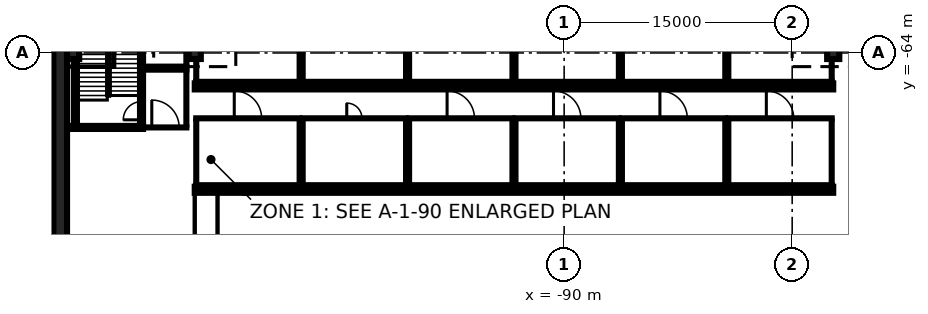
"""IFC4 building model, lengths in metres.
Left out: names, types, materials, properties, quantities, classifications, styles, units other than length and angle.
Written with IfcOpenShell. Run it as: python <this file> out.ifc"""

import sys

from ifc_helpers import new_model, si_unit, direction, frame, frame_2d, origin, origin_2d, place, context, subcontext, project, spatial, rectangle, extrude, element, fill, save


model = new_model("IFC4")
c1 = context("Model", 3, precision=1e-05, world=origin(), true_north=direction((0.0, 1.0)))
c2 = subcontext(c1, "Body", "Model", "MODEL_VIEW")
j1 = project(units=[si_unit("LENGTHUNIT", "METRE"), si_unit("PLANEANGLEUNIT", "RADIAN")], contexts=[c1])
p1 = place(None, origin())
s1 = spatial("IfcSite", under=j1, at=p1, CompositionType="ELEMENT")
p2 = place(p1, origin())
s2 = spatial("IfcBuilding", under=s1, at=p2, CompositionType="ELEMENT")
p3 = place(p2, frame((0.0, 0.0, -12.0)))
s3 = spatial("IfcBuildingStorey", under=s2, at=p3, CompositionType="ELEMENT", Elevation=-12.0)
p4 = place(p3, frame((-123.15, -80.0, 0.0), z_axis=(0.0, 0.0, 1.0), x_axis=(0.0, 1.0, 0.0)))
e1 = element("IfcWall", 1, at=p4, inside=s3, PredefinedType="USERDEFINED", context=c2, shape_type="SweptSolid", body=[
    extrude(rectangle(XDim=160.0, YDim=0.9, at=frame_2d((80.0, 0.0))), origin(), (0.0, 0.0, 1.0), 11.55),
])
for number, where, z_axis, x_axis in (
    (2, (-122.3, -64.0, 0.0), (0.0, 0.0, 1.0), (1.0, 0.0, 0.0)),
    (3, (-114.3, -64.0, 0.0), (0.0, 0.0, 1.0), (1.0, 0.0, 0.0)),
    (4, (-72.3, -64.0, 0.0), (0.0, 0.0, 1.0), (1.0, 0.0, 0.0)),
):
    element("IfcColumn", number, at=place(p3, frame(where, z_axis=z_axis, x_axis=x_axis)), inside=s3, PredefinedType="COLUMN", context=c2, shape_type="SweptSolid", body=[
        extrude(rectangle(XDim=0.8, YDim=0.8, at=origin_2d()), origin(), (0.0, 0.0, 1.0), 4.4),
    ])
p5 = place(p3, frame((-114.3, -72.7, 0.0), z_axis=(0.0, 0.0, 1.0), x_axis=(1.0, 0.0, 0.0)))
e5 = element("IfcWall", 5, at=p5, inside=s3, PredefinedType="PARTITIONING", context=c2, shape_type="SweptSolid", body=[
    extrude(rectangle(XDim=7.0, YDim=0.2, at=frame_2d((3.5, 0.0))), origin(), (0.0, 0.0, 1.0), 4.4),
])
p6 = place(p3, frame((-114.3, -68.3, 0.0), z_axis=(0.0, 0.0, 1.0), x_axis=(1.0, 0.0, 0.0)))
e6 = element("IfcWall", 6, at=p6, inside=s3, PredefinedType="PARTITIONING", context=c2, shape_type="SweptSolid", body=[
    extrude(rectangle(XDim=7.0, YDim=0.2, at=frame_2d((3.5, 0.0))), origin(), (0.0, 0.0, 1.0), 4.4),
])
p7 = place(p6, frame((2.6, 0.0, 0.0)))
e7 = element("IfcOpeningElement", 7, at=p7, cuts=e6, PredefinedType="OPENING", context=c2, shape_type="SweptSolid", body=[
    extrude(rectangle(XDim=1.8, YDim=2.1, at=frame_2d((0.9, 1.05))), frame((0.0, 0.11, 0.0), z_axis=(0.0, -1.0, 0.0), x_axis=(1.0, 0.0, 0.0)), (0.0, 0.0, 1.0), 0.22),
])
for number, where, z_axis, x_axis in (
    (8, (-114.2, -72.6, 0.0), (0.0, 0.0, 1.0), (0.0, 1.0, 0.0)),
    (9, (-107.4, -72.6, 0.0), (0.0, 0.0, 1.0), (0.0, 1.0, 0.0)),
):
    element("IfcWall", number, at=place(p3, frame(where, z_axis=z_axis, x_axis=x_axis)), inside=s3, PredefinedType="PARTITIONING", context=c2, shape_type="SweptSolid", body=[
        extrude(rectangle(XDim=4.2, YDim=0.2, at=frame_2d((2.1, 0.0))), origin(), (0.0, 0.0, 1.0), 4.4),
    ])
p8 = place(p3, frame((-107.3, -72.7, 0.0), z_axis=(0.0, 0.0, 1.0), x_axis=(1.0, 0.0, 0.0)))
e10 = element("IfcWall", 10, at=p8, inside=s3, PredefinedType="PARTITIONING", context=c2, shape_type="SweptSolid", body=[
    extrude(rectangle(XDim=7.0, YDim=0.2, at=frame_2d((3.5, 0.0))), origin(), (0.0, 0.0, 1.0), 4.4),
])
p9 = place(p3, frame((-107.3, -68.3, 0.0), z_axis=(0.0, 0.0, 1.0), x_axis=(1.0, 0.0, 0.0)))
e11 = element("IfcWall", 11, at=p9, inside=s3, PredefinedType="PARTITIONING", context=c2, shape_type="SweptSolid", body=[
    extrude(rectangle(XDim=7.0, YDim=0.2, at=frame_2d((3.5, 0.0))), origin(), (0.0, 0.0, 1.0), 4.4),
])
p10 = place(p9, frame((3.0, 0.0, 0.0)))
e12 = element("IfcOpeningElement", 12, at=p10, cuts=e11, PredefinedType="OPENING", context=c2, shape_type="SweptSolid", body=[
    extrude(rectangle(XDim=1.0, YDim=2.1, at=frame_2d((0.5, 1.05))), frame((0.0, 0.11, 0.0), z_axis=(0.0, -1.0, 0.0), x_axis=(1.0, 0.0, 0.0)), (0.0, 0.0, 1.0), 0.22),
])
for number, where, z_axis, x_axis in (
    (13, (-107.2, -72.6, 0.0), (0.0, 0.0, 1.0), (0.0, 1.0, 0.0)),
    (14, (-100.4, -72.6, 0.0), (0.0, 0.0, 1.0), (0.0, 1.0, 0.0)),
):
    element("IfcWall", number, at=place(p3, frame(where, z_axis=z_axis, x_axis=x_axis)), inside=s3, PredefinedType="PARTITIONING", context=c2, shape_type="SweptSolid", body=[
        extrude(rectangle(XDim=4.2, YDim=0.2, at=frame_2d((2.1, 0.0))), origin(), (0.0, 0.0, 1.0), 4.4),
    ])
p11 = place(p3, frame((-100.3, -72.7, 0.0), z_axis=(0.0, 0.0, 1.0), x_axis=(1.0, 0.0, 0.0)))
e15 = element("IfcWall", 15, at=p11, inside=s3, PredefinedType="PARTITIONING", context=c2, shape_type="SweptSolid", body=[
    extrude(rectangle(XDim=7.0, YDim=0.2, at=frame_2d((3.5, 0.0))), origin(), (0.0, 0.0, 1.0), 4.4),
])
p12 = place(p3, frame((-100.3, -68.3, 0.0), z_axis=(0.0, 0.0, 1.0), x_axis=(1.0, 0.0, 0.0)))
e16 = element("IfcWall", 16, at=p12, inside=s3, PredefinedType="PARTITIONING", context=c2, shape_type="SweptSolid", body=[
    extrude(rectangle(XDim=7.0, YDim=0.2, at=frame_2d((3.5, 0.0))), origin(), (0.0, 0.0, 1.0), 4.4),
])
p13 = place(p12, frame((2.6, 0.0, 0.0)))
e17 = element("IfcOpeningElement", 17, at=p13, cuts=e16, PredefinedType="OPENING", context=c2, shape_type="SweptSolid", body=[
    extrude(rectangle(XDim=1.8, YDim=2.1, at=frame_2d((0.9, 1.05))), frame((0.0, 0.11, 0.0), z_axis=(0.0, -1.0, 0.0), x_axis=(1.0, 0.0, 0.0)), (0.0, 0.0, 1.0), 0.22),
])
for number, where, z_axis, x_axis in (
    (18, (-100.2, -72.6, 0.0), (0.0, 0.0, 1.0), (0.0, 1.0, 0.0)),
    (19, (-93.4, -72.6, 0.0), (0.0, 0.0, 1.0), (0.0, 1.0, 0.0)),
):
    element("IfcWall", number, at=place(p3, frame(where, z_axis=z_axis, x_axis=x_axis)), inside=s3, PredefinedType="PARTITIONING", context=c2, shape_type="SweptSolid", body=[
        extrude(rectangle(XDim=4.2, YDim=0.2, at=frame_2d((2.1, 0.0))), origin(), (0.0, 0.0, 1.0), 4.4),
    ])
p14 = place(p3, frame((-93.3, -72.7, 0.0), z_axis=(0.0, 0.0, 1.0), x_axis=(1.0, 0.0, 0.0)))
e20 = element("IfcWall", 20, at=p14, inside=s3, PredefinedType="PARTITIONING", context=c2, shape_type="SweptSolid", body=[
    extrude(rectangle(XDim=7.0, YDim=0.2, at=frame_2d((3.5, 0.0))), origin(), (0.0, 0.0, 1.0), 4.4),
])
p15 = place(p3, frame((-93.3, -68.3, 0.0), z_axis=(0.0, 0.0, 1.0), x_axis=(1.0, 0.0, 0.0)))
e21 = element("IfcWall", 21, at=p15, inside=s3, PredefinedType="PARTITIONING", context=c2, shape_type="SweptSolid", body=[
    extrude(rectangle(XDim=7.0, YDim=0.2, at=frame_2d((3.5, 0.0))), origin(), (0.0, 0.0, 1.0), 4.4),
])
p16 = place(p15, frame((2.6, 0.0, 0.0)))
e22 = element("IfcOpeningElement", 22, at=p16, cuts=e21, PredefinedType="OPENING", context=c2, shape_type="SweptSolid", body=[
    extrude(rectangle(XDim=1.8, YDim=2.1, at=frame_2d((0.9, 1.05))), frame((0.0, 0.11, 0.0), z_axis=(0.0, -1.0, 0.0), x_axis=(1.0, 0.0, 0.0)), (0.0, 0.0, 1.0), 0.22),
])
for number, where, z_axis, x_axis in (
    (23, (-93.2, -72.6, 0.0), (0.0, 0.0, 1.0), (0.0, 1.0, 0.0)),
    (24, (-86.4, -72.6, 0.0), (0.0, 0.0, 1.0), (0.0, 1.0, 0.0)),
):
    element("IfcWall", number, at=place(p3, frame(where, z_axis=z_axis, x_axis=x_axis)), inside=s3, PredefinedType="PARTITIONING", context=c2, shape_type="SweptSolid", body=[
        extrude(rectangle(XDim=4.2, YDim=0.2, at=frame_2d((2.1, 0.0))), origin(), (0.0, 0.0, 1.0), 4.4),
    ])
p17 = place(p3, frame((-86.3, -72.7, 0.0), z_axis=(0.0, 0.0, 1.0), x_axis=(1.0, 0.0, 0.0)))
e25 = element("IfcWall", 25, at=p17, inside=s3, PredefinedType="PARTITIONING", context=c2, shape_type="SweptSolid", body=[
    extrude(rectangle(XDim=7.0, YDim=0.2, at=frame_2d((3.5, 0.0))), origin(), (0.0, 0.0, 1.0), 4.4),
])
p18 = place(p3, frame((-86.3, -68.3, 0.0), z_axis=(0.0, 0.0, 1.0), x_axis=(1.0, 0.0, 0.0)))
e26 = element("IfcWall", 26, at=p18, inside=s3, PredefinedType="PARTITIONING", context=c2, shape_type="SweptSolid", body=[
    extrude(rectangle(XDim=7.0, YDim=0.2, at=frame_2d((3.5, 0.0))), origin(), (0.0, 0.0, 1.0), 4.4),
])
p19 = place(p18, frame((2.6, 0.0, 0.0)))
e27 = element("IfcOpeningElement", 27, at=p19, cuts=e26, PredefinedType="OPENING", context=c2, shape_type="SweptSolid", body=[
    extrude(rectangle(XDim=1.8, YDim=2.1, at=frame_2d((0.9, 1.05))), frame((0.0, 0.11, 0.0), z_axis=(0.0, -1.0, 0.0), x_axis=(1.0, 0.0, 0.0)), (0.0, 0.0, 1.0), 0.22),
])
for number, where, z_axis, x_axis in (
    (28, (-86.2, -72.6, 0.0), (0.0, 0.0, 1.0), (0.0, 1.0, 0.0)),
    (29, (-79.4, -72.6, 0.0), (0.0, 0.0, 1.0), (0.0, 1.0, 0.0)),
):
    element("IfcWall", number, at=place(p3, frame(where, z_axis=z_axis, x_axis=x_axis)), inside=s3, PredefinedType="PARTITIONING", context=c2, shape_type="SweptSolid", body=[
        extrude(rectangle(XDim=4.2, YDim=0.2, at=frame_2d((2.1, 0.0))), origin(), (0.0, 0.0, 1.0), 4.4),
    ])
p20 = place(p3, frame((-79.3, -72.7, 0.0), z_axis=(0.0, 0.0, 1.0), x_axis=(1.0, 0.0, 0.0)))
e30 = element("IfcWall", 30, at=p20, inside=s3, PredefinedType="PARTITIONING", context=c2, shape_type="SweptSolid", body=[
    extrude(rectangle(XDim=7.0, YDim=0.2, at=frame_2d((3.5, 0.0))), origin(), (0.0, 0.0, 1.0), 4.4),
])
p21 = place(p3, frame((-79.3, -68.3, 0.0), z_axis=(0.0, 0.0, 1.0), x_axis=(1.0, 0.0, 0.0)))
e31 = element("IfcWall", 31, at=p21, inside=s3, PredefinedType="PARTITIONING", context=c2, shape_type="SweptSolid", body=[
    extrude(rectangle(XDim=7.0, YDim=0.2, at=frame_2d((3.5, 0.0))), origin(), (0.0, 0.0, 1.0), 4.4),
])
p22 = place(p21, frame((2.6, 0.0, 0.0)))
e32 = element("IfcOpeningElement", 32, at=p22, cuts=e31, PredefinedType="OPENING", context=c2, shape_type="SweptSolid", body=[
    extrude(rectangle(XDim=1.8, YDim=2.1, at=frame_2d((0.9, 1.05))), frame((0.0, 0.11, 0.0), z_axis=(0.0, -1.0, 0.0), x_axis=(1.0, 0.0, 0.0)), (0.0, 0.0, 1.0), 0.22),
])
for number, where, z_axis, x_axis in (
    (33, (-79.2, -72.6, 0.0), (0.0, 0.0, 1.0), (0.0, 1.0, 0.0)),
    (34, (-72.4, -72.6, 0.0), (0.0, 0.0, 1.0), (0.0, 1.0, 0.0)),
):
    element("IfcWall", number, at=place(p3, frame(where, z_axis=z_axis, x_axis=x_axis)), inside=s3, PredefinedType="PARTITIONING", context=c2, shape_type="SweptSolid", body=[
        extrude(rectangle(XDim=4.2, YDim=0.2, at=frame_2d((2.1, 0.0))), origin(), (0.0, 0.0, 1.0), 4.4),
    ])
p23 = place(p3, frame((-114.3, -65.9, 0.0), z_axis=(0.0, 0.0, 1.0), x_axis=(1.0, 0.0, 0.0)))
e35 = element("IfcWall", 35, at=p23, inside=s3, PredefinedType="PARTITIONING", context=c2, shape_type="SweptSolid", body=[
    extrude(rectangle(XDim=7.0, YDim=0.2, at=frame_2d((3.5, 0.0))), origin(), (0.0, 0.0, 1.0), 4.4),
])
p24 = place(p3, frame((-114.2, -65.8, 0.0), z_axis=(0.0, 0.0, 1.0), x_axis=(0.0, 1.0, 0.0)))
e36 = element("IfcWall", 36, at=p24, inside=s3, PredefinedType="PARTITIONING", context=c2, shape_type="SweptSolid", body=[
    extrude(rectangle(XDim=1.4, YDim=0.2, at=frame_2d((0.7, 0.0))), origin(), (0.0, 0.0, 1.0), 4.4),
])
p25 = place(p3, frame((-107.4, -65.8, 0.0), z_axis=(0.0, 0.0, 1.0), x_axis=(0.0, 1.0, 0.0)))
e37 = element("IfcWall", 37, at=p25, inside=s3, PredefinedType="PARTITIONING", context=c2, shape_type="SweptSolid", body=[
    extrude(rectangle(XDim=4.2, YDim=0.2, at=frame_2d((2.1, 0.0))), origin(), (0.0, 0.0, 1.0), 4.4),
])
p26 = place(p3, frame((-107.3, -65.9, 0.0), z_axis=(0.0, 0.0, 1.0), x_axis=(1.0, 0.0, 0.0)))
e38 = element("IfcWall", 38, at=p26, inside=s3, PredefinedType="PARTITIONING", context=c2, shape_type="SweptSolid", body=[
    extrude(rectangle(XDim=7.0, YDim=0.2, at=frame_2d((3.5, 0.0))), origin(), (0.0, 0.0, 1.0), 4.4),
])
for number, where, z_axis, x_axis in (
    (39, (-107.2, -65.8, 0.0), (0.0, 0.0, 1.0), (0.0, 1.0, 0.0)),
    (40, (-100.4, -65.8, 0.0), (0.0, 0.0, 1.0), (0.0, 1.0, 0.0)),
):
    element("IfcWall", number, at=place(p3, frame(where, z_axis=z_axis, x_axis=x_axis)), inside=s3, PredefinedType="PARTITIONING", context=c2, shape_type="SweptSolid", body=[
        extrude(rectangle(XDim=4.2, YDim=0.2, at=frame_2d((2.1, 0.0))), origin(), (0.0, 0.0, 1.0), 4.4),
    ])
p27 = place(p3, frame((-100.3, -65.9, 0.0), z_axis=(0.0, 0.0, 1.0), x_axis=(1.0, 0.0, 0.0)))
e41 = element("IfcWall", 41, at=p27, inside=s3, PredefinedType="PARTITIONING", context=c2, shape_type="SweptSolid", body=[
    extrude(rectangle(XDim=7.0, YDim=0.2, at=frame_2d((3.5, 0.0))), origin(), (0.0, 0.0, 1.0), 4.4),
])
for number, where, z_axis, x_axis in (
    (42, (-100.2, -65.8, 0.0), (0.0, 0.0, 1.0), (0.0, 1.0, 0.0)),
    (43, (-93.4, -65.8, 0.0), (0.0, 0.0, 1.0), (0.0, 1.0, 0.0)),
):
    element("IfcWall", number, at=place(p3, frame(where, z_axis=z_axis, x_axis=x_axis)), inside=s3, PredefinedType="PARTITIONING", context=c2, shape_type="SweptSolid", body=[
        extrude(rectangle(XDim=4.2, YDim=0.2, at=frame_2d((2.1, 0.0))), origin(), (0.0, 0.0, 1.0), 4.4),
    ])
p28 = place(p3, frame((-93.3, -65.9, 0.0), z_axis=(0.0, 0.0, 1.0), x_axis=(1.0, 0.0, 0.0)))
e44 = element("IfcWall", 44, at=p28, inside=s3, PredefinedType="PARTITIONING", context=c2, shape_type="SweptSolid", body=[
    extrude(rectangle(XDim=7.0, YDim=0.2, at=frame_2d((3.5, 0.0))), origin(), (0.0, 0.0, 1.0), 4.4),
])
for number, where, z_axis, x_axis in (
    (45, (-93.2, -65.8, 0.0), (0.0, 0.0, 1.0), (0.0, 1.0, 0.0)),
    (46, (-86.4, -65.8, 0.0), (0.0, 0.0, 1.0), (0.0, 1.0, 0.0)),
):
    element("IfcWall", number, at=place(p3, frame(where, z_axis=z_axis, x_axis=x_axis)), inside=s3, PredefinedType="PARTITIONING", context=c2, shape_type="SweptSolid", body=[
        extrude(rectangle(XDim=4.2, YDim=0.2, at=frame_2d((2.1, 0.0))), origin(), (0.0, 0.0, 1.0), 4.4),
    ])
p29 = place(p3, frame((-86.3, -65.9, 0.0), z_axis=(0.0, 0.0, 1.0), x_axis=(1.0, 0.0, 0.0)))
e47 = element("IfcWall", 47, at=p29, inside=s3, PredefinedType="PARTITIONING", context=c2, shape_type="SweptSolid", body=[
    extrude(rectangle(XDim=7.0, YDim=0.2, at=frame_2d((3.5, 0.0))), origin(), (0.0, 0.0, 1.0), 4.4),
])
for number, where, z_axis, x_axis in (
    (48, (-86.2, -65.8, 0.0), (0.0, 0.0, 1.0), (0.0, 1.0, 0.0)),
    (49, (-79.4, -65.8, 0.0), (0.0, 0.0, 1.0), (0.0, 1.0, 0.0)),
):
    element("IfcWall", number, at=place(p3, frame(where, z_axis=z_axis, x_axis=x_axis)), inside=s3, PredefinedType="PARTITIONING", context=c2, shape_type="SweptSolid", body=[
        extrude(rectangle(XDim=4.2, YDim=0.2, at=frame_2d((2.1, 0.0))), origin(), (0.0, 0.0, 1.0), 4.4),
    ])
p30 = place(p3, frame((-79.3, -65.9, 0.0), z_axis=(0.0, 0.0, 1.0), x_axis=(1.0, 0.0, 0.0)))
e50 = element("IfcWall", 50, at=p30, inside=s3, PredefinedType="PARTITIONING", context=c2, shape_type="SweptSolid", body=[
    extrude(rectangle(XDim=7.0, YDim=0.2, at=frame_2d((3.5, 0.0))), origin(), (0.0, 0.0, 1.0), 4.4),
])
p31 = place(p3, frame((-79.2, -65.8, 0.0), z_axis=(0.0, 0.0, 1.0), x_axis=(0.0, 1.0, 0.0)))
e51 = element("IfcWall", 51, at=p31, inside=s3, PredefinedType="PARTITIONING", context=c2, shape_type="SweptSolid", body=[
    extrude(rectangle(XDim=4.2, YDim=0.2, at=frame_2d((2.1, 0.0))), origin(), (0.0, 0.0, 1.0), 4.4),
])
p32 = place(p3, frame((-72.4, -65.8, 0.0), z_axis=(0.0, 0.0, 1.0), x_axis=(0.0, 1.0, 0.0)))
e52 = element("IfcWall", 52, at=p32, inside=s3, PredefinedType="PARTITIONING", context=c2, shape_type="SweptSolid", body=[
    extrude(rectangle(XDim=1.4, YDim=0.2, at=frame_2d((0.7, 0.0))), origin(), (0.0, 0.0, 1.0), 4.4),
])
p33 = place(p3, frame((-117.7, -68.9, 0.0), z_axis=(0.0, 0.0, 1.0), x_axis=(1.0, 0.0, 0.0)))
e53 = element("IfcWall", 53, at=p33, inside=s3, PredefinedType="PARTITIONING", context=c2, shape_type="SweptSolid", body=[
    extrude(rectangle(XDim=2.95, YDim=0.2, at=frame_2d((1.475, 0.0))), origin(), (0.0, 0.0, 1.0), 4.4),
])
p34 = place(p33, frame((0.575, 0.0, 0.0)))
e54 = element("IfcOpeningElement", 54, at=p34, cuts=e53, PredefinedType="OPENING", context=c2, shape_type="SweptSolid", body=[
    extrude(rectangle(XDim=1.8, YDim=2.1, at=frame_2d((0.9, 1.05))), frame((0.0, 0.11, 0.0), z_axis=(0.0, -1.0, 0.0), x_axis=(1.0, 0.0, 0.0)), (0.0, 0.0, 1.0), 0.22),
])
p35 = place(p3, frame((-117.7, -65.1, 0.0), z_axis=(0.0, 0.0, 1.0), x_axis=(1.0, 0.0, 0.0)))
e55 = element("IfcWall", 55, at=p35, inside=s3, PredefinedType="PARTITIONING", context=c2, shape_type="SweptSolid", body=[
    extrude(rectangle(XDim=2.95, YDim=0.2, at=frame_2d((1.475, 0.0))), origin(), (0.0, 0.0, 1.0), 4.4),
])
p36 = place(p3, frame((-114.85, -68.8, 0.0), z_axis=(0.0, 0.0, 1.0), x_axis=(0.0, 1.0, 0.0)))
e56 = element("IfcWall", 56, at=p36, inside=s3, PredefinedType="PARTITIONING", context=c2, shape_type="SweptSolid", body=[
    extrude(rectangle(XDim=3.6, YDim=0.2, at=frame_2d((1.8, 0.0))), origin(), (0.0, 0.0, 1.0), 4.4),
])
p37 = place(p3, frame((-117.7, -64.9, 0.0), z_axis=(0.0, 0.0, 1.0), x_axis=(1.0, 0.0, 0.0)))
e57 = element("IfcWall", 57, at=p37, inside=s3, PredefinedType="PARTITIONING", context=c2, shape_type="SweptSolid", body=[
    extrude(rectangle(XDim=2.95, YDim=0.2, at=frame_2d((1.475, 0.0))), origin(), (0.0, 0.0, 1.0), 4.4),
])
p38 = place(p3, frame((-114.85, -64.8, 0.0), z_axis=(0.0, 0.0, 1.0), x_axis=(0.0, 1.0, 0.0)))
e58 = element("IfcWall", 58, at=p38, inside=s3, PredefinedType="PARTITIONING", context=c2, shape_type="SweptSolid", body=[
    extrude(rectangle(XDim=5.6, YDim=0.2, at=frame_2d((2.8, 0.0))), origin(), (0.0, 0.0, 1.0), 4.4),
])
p39 = place(p3, frame((-122.15, -68.8, 0.0), z_axis=(0.0, 0.0, 1.0), x_axis=(0.0, 1.0, 0.0)))
e59 = element("IfcWall", 59, at=p39, inside=s3, PredefinedType="SOLIDWALL", context=c2, shape_type="SweptSolid", body=[
    extrude(rectangle(XDim=9.6, YDim=0.2, at=frame_2d((4.8, 0.0))), origin(), (0.0, 0.0, 1.0), 4.4),
])
p40 = place(p3, frame((-117.8, -68.8, 0.0), z_axis=(0.0, 0.0, 1.0), x_axis=(0.0, 1.0, 0.0)))
e60 = element("IfcWall", 60, at=p40, inside=s3, PredefinedType="SOLIDWALL", context=c2, shape_type="SweptSolid", body=[
    extrude(rectangle(XDim=9.6, YDim=0.2, at=frame_2d((4.8, 0.0))), origin(), (0.0, 0.0, 1.0), 4.4),
])
p41 = place(p40, frame((0.4, 0.0, 0.0)))
e61 = element("IfcOpeningElement", 61, at=p41, cuts=e60, PredefinedType="OPENING", context=c2, shape_type="SweptSolid", body=[
    extrude(rectangle(XDim=1.2, YDim=2.1, at=frame_2d((0.6, 1.05))), frame((0.0, 0.11, 0.0), z_axis=(0.0, -1.0, 0.0), x_axis=(1.0, 0.0, 0.0)), (0.0, 0.0, 1.0), 0.22),
])
p42 = place(p3, frame((-117.7, -68.9, 0.0), z_axis=(0.0, 0.0, 1.0), x_axis=(-1.0, 0.0, 0.0)))
e62 = element("IfcWall", 62, at=p42, inside=s3, PredefinedType="SOLIDWALL", context=c2, shape_type="SweptSolid", body=[
    extrude(rectangle(XDim=5.0, YDim=0.2, at=frame_2d((2.5, 0.0))), origin(), (0.0, 0.0, 1.0), 4.4),
])
p43 = place(p3, frame((-114.3, -73.0, 0.0), z_axis=(0.0, 0.0, 1.0), x_axis=(1.0, 0.0, 0.0)))
e63 = element("IfcWall", 63, at=p43, inside=s3, PredefinedType="SOLIDWALL", context=c2, shape_type="SweptSolid", body=[
    extrude(rectangle(XDim=3.3, YDim=0.4, at=frame_2d((1.65, 0.0))), origin(), (0.0, 0.0, 1.0), 4.4),
])
p44 = place(p3, frame((-111.0, -73.0, 0.0), z_axis=(0.0, 0.0, 1.0), x_axis=(1.0, 0.0, 0.0)))
e64 = element("IfcWall", 64, at=p44, inside=s3, PredefinedType="SOLIDWALL", context=c2, shape_type="SweptSolid", body=[
    extrude(rectangle(XDim=38.7, YDim=0.4, at=frame_2d((19.35, 0.0))), origin(), (0.0, 0.0, 1.0), 4.4),
])
p45 = place(p3, frame((-114.3, -66.2, 0.0), z_axis=(0.0, 0.0, 1.0), x_axis=(1.0, 0.0, 0.0)))
e65 = element("IfcWall", 65, at=p45, inside=s3, PredefinedType="SOLIDWALL", context=c2, shape_type="SweptSolid", body=[
    extrude(rectangle(XDim=42.0, YDim=0.4, at=frame_2d((21.0, 0.0))), origin(), (0.0, 0.0, 1.0), 4.4),
])
p46 = place(p7, origin())
e66 = element("IfcDoor", 66, at=p46, inside=s3, OperationType="DOUBLE_DOOR_SINGLE_SWING", PredefinedType="DOOR", context=c2, shape_type="SweptSolid", body=[
    extrude(rectangle(XDim=1.8, YDim=2.1, at=frame_2d((0.9, 1.05))), frame((0.0, 0.025, 0.0), z_axis=(0.0, -1.0, 0.0), x_axis=(1.0, 0.0, 0.0)), (0.0, 0.0, 1.0), 0.05),
])
fill(e7, e66)
p47 = place(p10, origin())
e67 = element("IfcDoor", 67, at=p47, inside=s3, OperationType="SINGLE_SWING_LEFT", PredefinedType="DOOR", context=c2, shape_type="SweptSolid", body=[
    extrude(rectangle(XDim=1.0, YDim=2.1, at=frame_2d((0.5, 1.05))), frame((0.0, 0.025, 0.0), z_axis=(0.0, -1.0, 0.0), x_axis=(1.0, 0.0, 0.0)), (0.0, 0.0, 1.0), 0.05),
])
fill(e12, e67)
p48 = place(p13, origin())
e68 = element("IfcDoor", 68, at=p48, inside=s3, OperationType="DOUBLE_DOOR_SINGLE_SWING", PredefinedType="DOOR", context=c2, shape_type="SweptSolid", body=[
    extrude(rectangle(XDim=1.8, YDim=2.1, at=frame_2d((0.9, 1.05))), frame((0.0, 0.025, 0.0), z_axis=(0.0, -1.0, 0.0), x_axis=(1.0, 0.0, 0.0)), (0.0, 0.0, 1.0), 0.05),
])
fill(e17, e68)
p49 = place(p16, origin())
e69 = element("IfcDoor", 69, at=p49, inside=s3, OperationType="DOUBLE_DOOR_SINGLE_SWING", PredefinedType="DOOR", context=c2, shape_type="SweptSolid", body=[
    extrude(rectangle(XDim=1.8, YDim=2.1, at=frame_2d((0.9, 1.05))), frame((0.0, 0.025, 0.0), z_axis=(0.0, -1.0, 0.0), x_axis=(1.0, 0.0, 0.0)), (0.0, 0.0, 1.0), 0.05),
])
fill(e22, e69)
p50 = place(p19, origin())
e70 = element("IfcDoor", 70, at=p50, inside=s3, OperationType="DOUBLE_DOOR_SINGLE_SWING", PredefinedType="DOOR", context=c2, shape_type="SweptSolid", body=[
    extrude(rectangle(XDim=1.8, YDim=2.1, at=frame_2d((0.9, 1.05))), frame((0.0, 0.025, 0.0), z_axis=(0.0, -1.0, 0.0), x_axis=(1.0, 0.0, 0.0)), (0.0, 0.0, 1.0), 0.05),
])
fill(e27, e70)
p51 = place(p22, origin())
e71 = element("IfcDoor", 71, at=p51, inside=s3, OperationType="DOUBLE_DOOR_SINGLE_SWING", PredefinedType="DOOR", context=c2, shape_type="SweptSolid", body=[
    extrude(rectangle(XDim=1.8, YDim=2.1, at=frame_2d((0.9, 1.05))), frame((0.0, 0.025, 0.0), z_axis=(0.0, -1.0, 0.0), x_axis=(1.0, 0.0, 0.0)), (0.0, 0.0, 1.0), 0.05),
])
fill(e32, e71)
p52 = place(p34, origin())
e72 = element("IfcDoor", 72, at=p52, inside=s3, OperationType="DOUBLE_DOOR_SINGLE_SWING", PredefinedType="DOOR", context=c2, shape_type="SweptSolid", body=[
    extrude(rectangle(XDim=1.8, YDim=2.1, at=frame_2d((0.9, 1.05))), frame((0.0, 0.025, 0.0), z_axis=(0.0, -1.0, 0.0), x_axis=(1.0, 0.0, 0.0)), (0.0, 0.0, 1.0), 0.05),
])
fill(e54, e72)
p53 = place(p41, origin())
e73 = element("IfcDoor", 73, at=p53, inside=s3, OperationType="SINGLE_SWING_LEFT", PredefinedType="DOOR", context=c2, shape_type="SweptSolid", body=[
    extrude(rectangle(XDim=1.2, YDim=2.1, at=frame_2d((0.6, 1.05))), frame((0.0, 0.025, 0.0), z_axis=(0.0, -1.0, 0.0), x_axis=(1.0, 0.0, 0.0)), (0.0, 0.0, 1.0), 0.05),
])
fill(e61, e73)
save(model, sys.argv[1])
